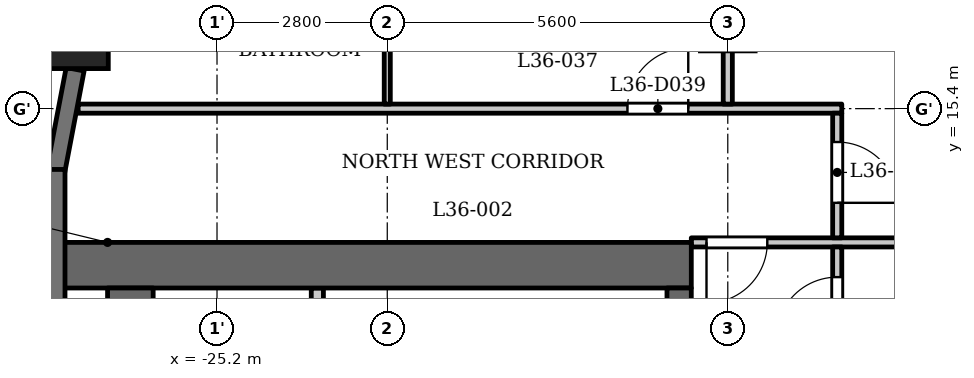
"""IFC4 building model, lengths in metres.
Left out: names, types, materials, properties, quantities, classifications, styles, units other than length and angle.
Written with IfcOpenShell. Run it as: python <this file> out.ifc"""

import sys

from ifc_helpers import new_model, si_unit, direction, frame, frame_2d, origin, origin_2d, place, context, subcontext, project, spatial, rectangle, extrude, element, fill, save


model = new_model("IFC4")
c1 = context("Model", 3, precision=1e-05, world=origin(), true_north=direction((0.0, 1.0)))
c2 = subcontext(c1, "Body", "Model", "MODEL_VIEW")
j1 = project(units=[si_unit("LENGTHUNIT", "METRE"), si_unit("PLANEANGLEUNIT", "RADIAN")], contexts=[c1])
p1 = place(None, origin())
s1 = spatial("IfcSite", under=j1, at=p1, CompositionType="ELEMENT")
p2 = place(p1, origin())
s2 = spatial("IfcBuilding", under=s1, at=p2, CompositionType="ELEMENT")
p3 = place(p2, frame((0.0, 0.0, 143.1)))
s3 = spatial("IfcBuildingStorey", under=s2, at=p3, CompositionType="ELEMENT", Elevation=143.1)
p4 = place(p3, frame((-27.538, 16.609, 0.0), z_axis=(0.0, 0.0, 1.0), x_axis=(1.0, 0.0, 0.0)))
e1 = element("IfcColumn", 1, at=p4, inside=s3, PredefinedType="COLUMN", context=c2, shape_type="SweptSolid", body=[
    extrude(rectangle(XDim=1.1, YDim=1.1, at=origin_2d()), origin(), (0.0, 0.0, 1.0), 3.5),
])
p5 = place(p3, frame((-27.533, 16.048, 0.0), z_axis=(0.0, 0.0, 1.0), x_axis=(-0.187302784601, -0.982302227871, 0.0)))
e2 = element("IfcWall", 2, at=p5, inside=s3, PredefinedType="SOLIDWALL", context=c2, shape_type="SweptSolid", body=[
    extrude(rectangle(XDim=1.706, YDim=0.3, at=frame_2d((0.853, 0.0))), origin(), (0.0, 0.0, 1.0), 2.45),
])
p6 = place(p3, frame((-27.85, 14.4, 0.0), z_axis=(0.0, 0.0, 1.0), x_axis=(0.0, -1.0, 0.0)))
e3 = element("IfcWall", 3, at=p6, inside=s3, PredefinedType="SOLIDWALL", context=c2, shape_type="SweptSolid", body=[
    extrude(rectangle(XDim=2.65, YDim=0.3, at=frame_2d((1.325, 0.0))), origin(), (0.0, 0.0, 1.0), 2.45),
])
p7 = place(p3, frame((-17.4, 12.825, 0.0), z_axis=(0.0, 0.0, 1.0), x_axis=(-1.0, 0.0, 0.0)))
e4 = element("IfcWall", 4, at=p7, inside=s3, PredefinedType="SHEAR", context=c2, shape_type="SweptSolid", body=[
    extrude(rectangle(XDim=10.4, YDim=0.75, at=frame_2d((5.2, 0.0))), origin(), (0.0, 0.0, 1.0), 3.2),
])
p8 = place(p3, frame((-17.6, -12.45, 0.0), z_axis=(0.0, 0.0, 1.0), x_axis=(0.0, 1.0, 0.0)))
e5 = element("IfcWall", 5, at=p8, inside=s3, PredefinedType="SHEAR", context=c2, shape_type="SweptSolid", body=[
    extrude(rectangle(XDim=24.9, YDim=0.4, at=frame_2d((12.45, 0.0))), origin(), (0.0, 0.0, 1.0), 3.2),
])
p9 = place(p8, frame((8.65, 0.0, 0.0)))
e6 = element("IfcOpeningElement", 6, at=p9, cuts=e5, PredefinedType="OPENING", context=c2, shape_type="SweptSolid", body=[
    extrude(rectangle(XDim=0.9, YDim=2.1, at=frame_2d((0.45, 1.05))), frame((0.0, 0.21, 0.0), z_axis=(0.0, -1.0, 0.0), x_axis=(1.0, 0.0, 0.0)), (0.0, 0.0, 1.0), 0.42),
])
p10 = place(p8, frame((15.6, 0.0, 0.0)))
e7 = element("IfcOpeningElement", 7, at=p10, cuts=e5, PredefinedType="OPENING", context=c2, shape_type="SweptSolid", body=[
    extrude(rectangle(XDim=1.1, YDim=2.1, at=frame_2d((0.55, 1.05))), frame((0.0, 0.21, 0.0), z_axis=(0.0, -1.0, 0.0), x_axis=(1.0, 0.0, 0.0)), (0.0, 0.0, 1.0), 0.42),
])
p11 = place(p8, frame((18.0, 0.0, 0.0)))
e8 = element("IfcOpeningElement", 8, at=p11, cuts=e5, PredefinedType="OPENING", context=c2, shape_type="SweptSolid", body=[
    extrude(rectangle(XDim=1.1, YDim=2.1, at=frame_2d((0.55, 1.05))), frame((0.0, 0.21, 0.0), z_axis=(0.0, -1.0, 0.0), x_axis=(1.0, 0.0, 0.0)), (0.0, 0.0, 1.0), 0.42),
])
p12 = place(p8, frame((23.025, 0.0, 0.0)))
e9 = element("IfcOpeningElement", 9, at=p12, cuts=e5, PredefinedType="OPENING", context=c2, shape_type="SweptSolid", body=[
    extrude(rectangle(XDim=1.1, YDim=2.1, at=frame_2d((0.55, 1.05))), frame((0.0, 0.21, 0.0), z_axis=(0.0, -1.0, 0.0), x_axis=(1.0, 0.0, 0.0)), (0.0, 0.0, 1.0), 0.42),
])
p13 = place(p8, frame((0.775, 0.0, 0.0)))
e10 = element("IfcOpeningElement", 10, at=p13, cuts=e5, PredefinedType="OPENING", context=c2, shape_type="SweptSolid", body=[
    extrude(rectangle(XDim=1.1, YDim=2.1, at=frame_2d((0.55, 1.05))), frame((0.0, 0.21, 0.0), z_axis=(0.0, -1.0, 0.0), x_axis=(1.0, 0.0, 0.0)), (0.0, 0.0, 1.0), 0.42),
])
p14 = place(p8, frame((12.925, 0.0, 0.0)))
e11 = element("IfcOpeningElement", 11, at=p14, cuts=e5, PredefinedType="OPENING", context=c2, shape_type="SweptSolid", body=[
    extrude(rectangle(XDim=1.8, YDim=2.1, at=frame_2d((0.9, 1.05))), frame((0.0, 0.21, 0.0), z_axis=(0.0, -1.0, 0.0), x_axis=(1.0, 0.0, 0.0)), (0.0, 0.0, 1.0), 0.42),
])
p15 = place(p3, frame((-26.625, -12.45, 0.0), z_axis=(0.0, 0.0, 1.0), x_axis=(0.0, 1.0, 0.0)))
e12 = element("IfcWall", 12, at=p15, inside=s3, PredefinedType="SHEAR", context=c2, shape_type="SweptSolid", body=[
    extrude(rectangle(XDim=24.9, YDim=0.75, at=frame_2d((12.45, 0.0))), origin(), (0.0, 0.0, 1.0), 3.2),
])
p16 = place(p3, frame((-23.55, 9.8, 0.0), z_axis=(0.0, 0.0, 1.0), x_axis=(0.0, 1.0, 0.0)))
e13 = element("IfcWall", 13, at=p16, inside=s3, PredefinedType="PARTITIONING", context=c2, shape_type="SweptSolid", body=[
    extrude(rectangle(XDim=2.65, YDim=0.2, at=frame_2d((1.325, 0.0))), origin(), (0.0, 0.0, 1.0), 3.2),
])
p17 = place(p16, frame((0.875, 0.0, 0.0)))
e14 = element("IfcOpeningElement", 14, at=p17, cuts=e13, PredefinedType="OPENING", context=c2, shape_type="SweptSolid", body=[
    extrude(rectangle(XDim=0.9, YDim=2.1, at=frame_2d((0.45, 1.05))), frame((0.0, 0.11, 0.0), z_axis=(0.0, -1.0, 0.0), x_axis=(1.0, 0.0, 0.0)), (0.0, 0.0, 1.0), 0.22),
])
p18 = place(p3, frame((-17.4, 13.2, 0.0), z_axis=(0.0, 0.0, 1.0), x_axis=(1.0, 0.0, 0.0)))
e15 = element("IfcWall", 15, at=p18, inside=s3, PredefinedType="PARTITIONING", context=c2, shape_type="SweptSolid", body=[
    extrude(rectangle(XDim=34.8, YDim=0.15, at=frame_2d((17.4, 0.0))), origin(), (0.0, 0.0, 1.0), 3.2),
])
p19 = place(p18, frame((0.25, 0.0, 0.0)))
e16 = element("IfcOpeningElement", 16, at=p19, cuts=e15, PredefinedType="OPENING", context=c2, shape_type="SweptSolid", body=[
    extrude(rectangle(XDim=1.0, YDim=2.1, at=frame_2d((0.5, 1.05))), frame((0.0, 0.085, 0.0), z_axis=(0.0, -1.0, 0.0), x_axis=(1.0, 0.0, 0.0)), (0.0, 0.0, 1.0), 0.17),
])
p20 = place(p18, frame((33.65, 0.0, 0.0)))
e17 = element("IfcOpeningElement", 17, at=p20, cuts=e15, PredefinedType="OPENING", context=c2, shape_type="SweptSolid", body=[
    extrude(rectangle(XDim=1.0, YDim=2.1, at=frame_2d((0.5, 1.05))), frame((0.0, 0.085, 0.0), z_axis=(0.0, -1.0, 0.0), x_axis=(1.0, 0.0, 0.0)), (0.0, 0.0, 1.0), 0.17),
])
p21 = place(p18, frame((15.75, 0.0, 0.0)))
e18 = element("IfcOpeningElement", 18, at=p21, cuts=e15, PredefinedType="OPENING", context=c2, shape_type="SweptSolid", body=[
    extrude(rectangle(XDim=1.0, YDim=2.1, at=frame_2d((0.5, 1.05))), frame((0.0, 0.085, 0.0), z_axis=(0.0, -1.0, 0.0), x_axis=(1.0, 0.0, 0.0)), (0.0, 0.0, 1.0), 0.17),
])
p22 = place(p18, frame((19.35, 0.0, 0.0)))
e19 = element("IfcOpeningElement", 19, at=p22, cuts=e15, PredefinedType="OPENING", context=c2, shape_type="SweptSolid", body=[
    extrude(rectangle(XDim=1.0, YDim=2.1, at=frame_2d((0.5, 1.05))), frame((0.0, 0.085, 0.0), z_axis=(0.0, -1.0, 0.0), x_axis=(1.0, 0.0, 0.0)), (0.0, 0.0, 1.0), 0.17),
])
p23 = place(p18, frame((26.95, 0.0, 0.0)))
e20 = element("IfcOpeningElement", 20, at=p23, cuts=e15, PredefinedType="OPENING", context=c2, shape_type="SweptSolid", body=[
    extrude(rectangle(XDim=1.0, YDim=2.1, at=frame_2d((0.5, 1.05))), frame((0.0, 0.085, 0.0), z_axis=(0.0, -1.0, 0.0), x_axis=(1.0, 0.0, 0.0)), (0.0, 0.0, 1.0), 0.17),
])
p24 = place(p18, frame((29.75, 0.0, 0.0)))
e21 = element("IfcOpeningElement", 21, at=p24, cuts=e15, PredefinedType="OPENING", context=c2, shape_type="SweptSolid", body=[
    extrude(rectangle(XDim=1.0, YDim=2.1, at=frame_2d((0.5, 1.05))), frame((0.0, 0.085, 0.0), z_axis=(0.0, -1.0, 0.0), x_axis=(1.0, 0.0, 0.0)), (0.0, 0.0, 1.0), 0.17),
])
p25 = place(p3, frame((-27.484, 15.4, 0.0), z_axis=(0.0, 0.0, 1.0), x_axis=(1.0, 0.0, 0.0)))
e22 = element("IfcWall", 22, at=p25, inside=s3, PredefinedType="PARTITIONING", context=c2, shape_type="SweptSolid", body=[
    extrude(rectangle(XDim=12.559, YDim=0.15, at=frame_2d((6.279, 0.0))), origin(), (0.0, 0.0, 1.0), 3.2),
])
p26 = place(p25, frame((9.034, 0.0, 0.0)))
e23 = element("IfcOpeningElement", 23, at=p26, cuts=e22, PredefinedType="OPENING", context=c2, shape_type="SweptSolid", body=[
    extrude(rectangle(XDim=1.0, YDim=2.1, at=frame_2d((0.5, 1.05))), frame((0.0, 0.085, 0.0), z_axis=(0.0, -1.0, 0.0), x_axis=(1.0, 0.0, 0.0)), (0.0, 0.0, 1.0), 0.17),
])
p27 = place(p3, frame((-22.4, 15.475, 0.0), z_axis=(0.0, 0.0, 1.0), x_axis=(0.0, 1.0, 0.0)))
e24 = element("IfcWall", 24, at=p27, inside=s3, PredefinedType="PARTITIONING", context=c2, shape_type="SweptSolid", body=[
    extrude(rectangle(XDim=2.575, YDim=0.1, at=frame_2d((1.288, 0.0))), origin(), (0.0, 0.0, 1.0), 3.2),
])
p28 = place(p3, frame((-16.8, 15.475, 0.0), z_axis=(0.0, 0.0, 1.0), x_axis=(0.0, 1.0, 0.0)))
e25 = element("IfcWall", 25, at=p28, inside=s3, PredefinedType="PARTITIONING", context=c2, shape_type="SweptSolid", body=[
    extrude(rectangle(XDim=7.455, YDim=0.15, at=frame_2d((3.728, 0.0))), origin(), (0.0, 0.0, 1.0), 3.2),
])
p29 = place(p3, frame((-15.0, 6.769, 0.0), z_axis=(0.0, 0.0, 1.0), x_axis=(0.0, 1.0, 0.0)))
e26 = element("IfcWall", 26, at=p29, inside=s3, PredefinedType="PARTITIONING", context=c2, shape_type="SweptSolid", body=[
    extrude(rectangle(XDim=6.356, YDim=0.15, at=frame_2d((3.178, 0.0))), origin(), (0.0, 0.0, 1.0), 3.2),
])
p30 = place(p29, frame((4.86, 0.0, 0.0)))
e27 = element("IfcOpeningElement", 27, at=p30, cuts=e26, PredefinedType="OPENING", context=c2, shape_type="SweptSolid", body=[
    extrude(rectangle(XDim=1.0, YDim=2.1, at=frame_2d((0.5, 1.05))), frame((0.0, 0.085, 0.0), z_axis=(0.0, -1.0, 0.0), x_axis=(1.0, 0.0, 0.0)), (0.0, 0.0, 1.0), 0.17),
])
p31 = place(p3, frame((-15.0, 13.275, 0.0), z_axis=(0.0, 0.0, 1.0), x_axis=(0.0, 1.0, 0.0)))
e28 = element("IfcWall", 28, at=p31, inside=s3, PredefinedType="PARTITIONING", context=c2, shape_type="SweptSolid", body=[
    extrude(rectangle(XDim=2.05, YDim=0.15, at=frame_2d((1.025, 0.0))), origin(), (0.0, 0.0, 1.0), 3.2),
])
p32 = place(p31, frame((0.576, 0.0, 0.0)))
e29 = element("IfcOpeningElement", 29, at=p32, cuts=e28, PredefinedType="OPENING", context=c2, shape_type="SweptSolid", body=[
    extrude(rectangle(XDim=1.0, YDim=2.1, at=frame_2d((0.5, 1.05))), frame((0.0, 0.085, 0.0), z_axis=(0.0, -1.0, 0.0), x_axis=(1.0, 0.0, 0.0)), (0.0, 0.0, 1.0), 0.17),
])
p33 = place(p30, origin())
e30 = element("IfcDoor", 30, at=p33, inside=s3, OperationType="SINGLE_SWING_RIGHT", PredefinedType="DOOR", context=c2, shape_type="SweptSolid", body=[
    extrude(rectangle(XDim=1.0, YDim=2.1, at=frame_2d((0.5, 1.05))), frame((0.0, 0.025, 0.0), z_axis=(0.0, -1.0, 0.0), x_axis=(1.0, 0.0, 0.0)), (0.0, 0.0, 1.0), 0.05),
])
fill(e27, e30)
p34 = place(p19, origin())
e31 = element("IfcDoor", 31, at=p34, inside=s3, OperationType="SINGLE_SWING_LEFT", PredefinedType="DOOR", context=c2, shape_type="SweptSolid", body=[
    extrude(rectangle(XDim=1.0, YDim=2.1, at=frame_2d((0.5, 1.05))), frame((0.0, 0.025, 0.0), z_axis=(0.0, -1.0, 0.0), x_axis=(1.0, 0.0, 0.0)), (0.0, 0.0, 1.0), 0.05),
])
fill(e16, e31)
p35 = place(p32, origin())
e32 = element("IfcDoor", 32, at=p35, inside=s3, OperationType="SINGLE_SWING_LEFT", PredefinedType="DOOR", context=c2, shape_type="SweptSolid", body=[
    extrude(rectangle(XDim=1.0, YDim=2.1, at=frame_2d((0.5, 1.05))), frame((0.0, 0.025, 0.0), z_axis=(0.0, -1.0, 0.0), x_axis=(1.0, 0.0, 0.0)), (0.0, 0.0, 1.0), 0.05),
])
fill(e29, e32)
p36 = place(p26, origin())
e33 = element("IfcDoor", 33, at=p36, inside=s3, OperationType="SINGLE_SWING_LEFT", PredefinedType="DOOR", context=c2, shape_type="SweptSolid", body=[
    extrude(rectangle(XDim=1.0, YDim=2.1, at=frame_2d((0.5, 1.05))), frame((0.0, 0.025, 0.0), z_axis=(0.0, -1.0, 0.0), x_axis=(1.0, 0.0, 0.0)), (0.0, 0.0, 1.0), 0.05),
])
fill(e23, e33)
save(model, sys.argv[1])
